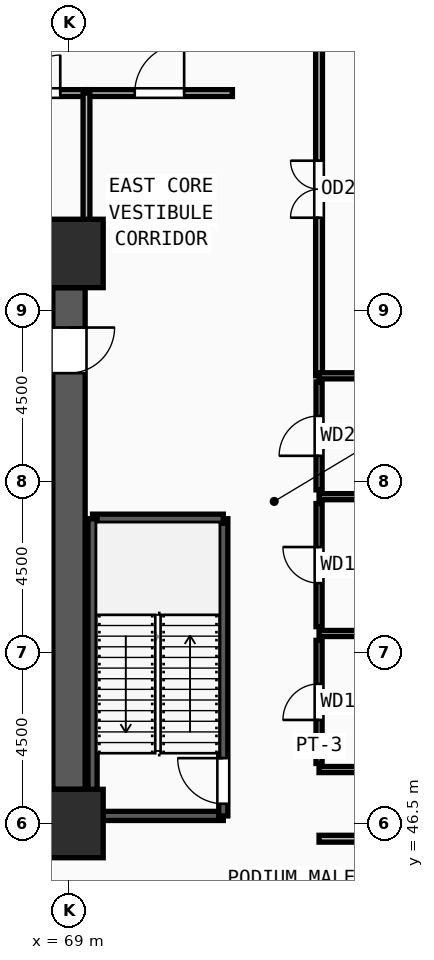
"""IFC4 building model, lengths in metres.
Left out: names, types, materials, properties, quantities, classifications, styles, units other than length and angle.
Written with IfcOpenShell. Run it as: python <this file> out.ifc"""

import sys

from ifc_helpers import new_model, si_unit, direction, frame, frame_2d, origin, origin_2d, place, context, subcontext, project, spatial, rectangle, extrude, source, transform, mapped, element, fill, save


model = new_model("IFC4")
c1 = context("Model", 3, precision=1e-05, world=origin(), true_north=direction((0.0, 1.0)))
c2 = subcontext(c1, "Body", "Model", "MODEL_VIEW")
j1 = project(units=[si_unit("LENGTHUNIT", "METRE"), si_unit("PLANEANGLEUNIT", "RADIAN")], contexts=[c1])
p1 = place(None, origin())
s1 = spatial("IfcSite", under=j1, at=p1, CompositionType="ELEMENT")
p2 = place(p1, origin())
s2 = spatial("IfcBuilding", under=s1, at=p2, CompositionType="ELEMENT")
p3 = place(p2, frame((0.0, 0.0, 14.4)))
s3 = spatial("IfcBuildingStorey", under=s2, at=p3, CompositionType="ELEMENT", Elevation=14.4)
m1 = source(origin(), c2, "Body", "SweptSolid", [
    extrude(rectangle(XDim=1.8, YDim=1.8, at=origin_2d()), origin(), (0.0, 0.0, 1.0), 4.5),
])
for number, where, z_axis, x_axis in (
    (1, (69.0, 46.5, 0.0), (0.0, 0.0, 1.0), (1.0, 0.0, 0.0)),
    (2, (69.0, 61.5, 0.0), (0.0, 0.0, 1.0), (1.0, 0.0, 0.0)),
):
    element("IfcColumn", number, at=place(p3, frame(where, z_axis=z_axis, x_axis=x_axis)), inside=s3, PredefinedType="COLUMN", context=c2, shape_type="MappedRepresentation", body=[
        mapped(m1, transform((0.0, 0.0, 0.0), x_axis=(1.0, 0.0, 0.0), y_axis=(0.0, 1.0, 0.0), z_axis=(0.0, 0.0, 1.0), scale=1.0)),
    ])
p4 = place(p3, frame((69.0, 60.6, 0.0), z_axis=(0.0, 0.0, 1.0), x_axis=(0.0, -1.0, 0.0)))
e3 = element("IfcWall", 3, at=p4, inside=s3, PredefinedType="SHEAR", context=c2, shape_type="SweptSolid", body=[
    extrude(rectangle(XDim=13.2, YDim=0.85, at=frame_2d((6.6, 0.0))), origin(), (0.0, 0.0, 1.0), 4.25),
])
m2 = source(origin(), c2, "Body", "SweptSolid", [
    extrude(rectangle(XDim=1.2, YDim=2.2, at=frame_2d((0.6, 1.1))), frame((0.0, 0.435, 0.0), z_axis=(0.0, -1.0, 0.0), x_axis=(1.0, 0.0, 0.0)), (0.0, 0.0, 1.0), 0.87),
])
p5 = place(p4, frame((1.05, 0.0, 0.0)))
e4 = element("IfcOpeningElement", 4, at=p5, cuts=e3, PredefinedType="OPENING", context=c2, shape_type="MappedRepresentation", body=[
    mapped(m2, transform((0.0, 0.0, 0.0), x_axis=(1.0, 0.0, 0.0), y_axis=(0.0, 1.0, 0.0), z_axis=(0.0, 0.0, 1.0), scale=1.0)),
])
p6 = place(p3, frame((69.62, 46.7, 0.0), z_axis=(0.0, 0.0, 1.0), x_axis=(1.0, 0.0, 0.0)))
e5 = element("IfcWall", 5, at=p6, inside=s3, PredefinedType="SOLIDWALL", context=c2, shape_type="SweptSolid", body=[
    extrude(rectangle(XDim=3.44, YDim=0.24, at=frame_2d((1.72, 0.0))), origin(), (0.0, 0.0, 1.0), 4.25),
])
p7 = place(p3, frame((73.06, 46.7, 0.0), z_axis=(0.0, 0.0, 1.0), x_axis=(0.0, 1.0, 0.0)))
e6 = element("IfcWall", 6, at=p7, inside=s3, PredefinedType="SOLIDWALL", context=c2, shape_type="SweptSolid", body=[
    extrude(rectangle(XDim=7.82, YDim=0.24, at=frame_2d((3.91, 0.0))), origin(), (0.0, 0.0, 1.0), 4.25),
])
m3 = source(origin(), c2, "Body", "SweptSolid", [
    extrude(rectangle(XDim=1.2, YDim=2.2, at=frame_2d((0.6, 1.1))), frame((0.0, 0.13, 0.0), z_axis=(0.0, -1.0, 0.0), x_axis=(1.0, 0.0, 0.0)), (0.0, 0.0, 1.0), 0.26),
])
p8 = place(p7, frame((0.32, 0.0, 0.0)))
e7 = element("IfcOpeningElement", 7, at=p8, cuts=e6, PredefinedType="OPENING", context=c2, shape_type="MappedRepresentation", body=[
    mapped(m3, transform((0.0, 0.0, 0.0), x_axis=(1.0, 0.0, 0.0), y_axis=(0.0, 1.0, 0.0), z_axis=(0.0, 0.0, 1.0), scale=1.0)),
])
p9 = place(p3, frame((73.06, 54.52, 0.0), z_axis=(0.0, 0.0, 1.0), x_axis=(-1.0, 0.0, 0.0)))
e8 = element("IfcWall", 8, at=p9, inside=s3, PredefinedType="SOLIDWALL", context=c2, shape_type="SweptSolid", body=[
    extrude(rectangle(XDim=3.44, YDim=0.24, at=frame_2d((1.72, 0.0))), origin(), (0.0, 0.0, 1.0), 4.25),
])
p10 = place(p3, frame((69.62, 54.52, 0.0), z_axis=(0.0, 0.0, 1.0), x_axis=(0.0, -1.0, 0.0)))
e9 = element("IfcWall", 9, at=p10, inside=s3, PredefinedType="SOLIDWALL", context=c2, shape_type="SweptSolid", body=[
    extrude(rectangle(XDim=7.82, YDim=0.24, at=frame_2d((3.91, 0.0))), origin(), (0.0, 0.0, 1.0), 4.25),
])
p11 = place(p3, frame((75.58, 48.08, 0.0), z_axis=(0.0, 0.0, 1.0), x_axis=(0.0, 1.0, 0.0)))
e10 = element("IfcWall", 10, at=p11, inside=s3, PredefinedType="PARTITIONING", context=c2, shape_type="SweptSolid", body=[
    extrude(rectangle(XDim=3.24, YDim=0.16, at=frame_2d((1.62, 0.0))), origin(), (0.0, 0.0, 1.0), 4.25),
])
m4 = source(origin(), c2, "Body", "SweptSolid", [
    extrude(rectangle(XDim=0.95, YDim=2.15, at=frame_2d((0.475, 1.075))), frame((0.0, 0.09, 0.0), z_axis=(0.0, -1.0, 0.0), x_axis=(1.0, 0.0, 0.0)), (0.0, 0.0, 1.0), 0.18),
])
p12 = place(p11, frame((1.145, 0.0, 0.0)))
e11 = element("IfcOpeningElement", 11, at=p12, cuts=e10, PredefinedType="OPENING", context=c2, shape_type="MappedRepresentation", body=[
    mapped(m4, transform((0.0, 0.0, 0.0), x_axis=(1.0, 0.0, 0.0), y_axis=(0.0, 1.0, 0.0), z_axis=(0.0, 0.0, 1.0), scale=1.0)),
])
p13 = place(p3, frame((75.58, 51.68, 0.0), z_axis=(0.0, 0.0, 1.0), x_axis=(0.0, 1.0, 0.0)))
e12 = element("IfcWall", 12, at=p13, inside=s3, PredefinedType="PARTITIONING", context=c2, shape_type="SweptSolid", body=[
    extrude(rectangle(XDim=3.24, YDim=0.16, at=frame_2d((1.62, 0.0))), origin(), (0.0, 0.0, 1.0), 4.25),
])
p14 = place(p13, frame((1.145, 0.0, 0.0)))
e13 = element("IfcOpeningElement", 13, at=p14, cuts=e12, PredefinedType="OPENING", context=c2, shape_type="MappedRepresentation", body=[
    mapped(m4, transform((0.0, 0.0, 0.0), x_axis=(1.0, 0.0, 0.0), y_axis=(0.0, 1.0, 0.0), z_axis=(0.0, 0.0, 1.0), scale=1.0)),
])
p15 = place(p3, frame((75.58, 55.28, 0.0), z_axis=(0.0, 0.0, 1.0), x_axis=(0.0, 1.0, 0.0)))
e14 = element("IfcWall", 14, at=p15, inside=s3, PredefinedType="PARTITIONING", context=c2, shape_type="SweptSolid", body=[
    extrude(rectangle(XDim=2.84, YDim=0.16, at=frame_2d((1.42, 0.0))), origin(), (0.0, 0.0, 1.0), 4.25),
])
m5 = source(origin(), c2, "Body", "SweptSolid", [
    extrude(rectangle(XDim=1.05, YDim=2.15, at=frame_2d((0.525, 1.075))), frame((0.0, 0.09, 0.0), z_axis=(0.0, -1.0, 0.0), x_axis=(1.0, 0.0, 0.0)), (0.0, 0.0, 1.0), 0.18),
])
p16 = place(p15, frame((0.895, 0.0, 0.0)))
e15 = element("IfcOpeningElement", 15, at=p16, cuts=e14, PredefinedType="OPENING", context=c2, shape_type="MappedRepresentation", body=[
    mapped(m5, transform((0.0, 0.0, 0.0), x_axis=(1.0, 0.0, 0.0), y_axis=(0.0, 1.0, 0.0), z_axis=(0.0, 0.0, 1.0), scale=1.0)),
])
p17 = place(p3, frame((67.08, 65.72, 0.0), z_axis=(0.0, 0.0, 1.0), x_axis=(1.0, 0.0, 0.0)))
e16 = element("IfcWall", 16, at=p17, inside=s3, PredefinedType="PARTITIONING", context=c2, shape_type="SweptSolid", body=[
    extrude(rectangle(XDim=2.38, YDim=0.18, at=frame_2d((1.19, 0.0))), origin(), (0.0, 0.0, 1.0), 4.25),
])
m6 = source(origin(), c2, "Body", "SweptSolid", [
    extrude(rectangle(XDim=1.0, YDim=2.2, at=frame_2d((0.5, 1.1))), frame((0.0, 0.1, 0.0), z_axis=(0.0, -1.0, 0.0), x_axis=(1.0, 0.0, 0.0)), (0.0, 0.0, 1.0), 0.2),
])
p18 = place(p17, frame((0.69, 0.0, 0.0)))
e17 = element("IfcOpeningElement", 17, at=p18, cuts=e16, PredefinedType="OPENING", context=c2, shape_type="MappedRepresentation", body=[
    mapped(m6, transform((0.0, 0.0, 0.0), x_axis=(1.0, 0.0, 0.0), y_axis=(0.0, 1.0, 0.0), z_axis=(0.0, 0.0, 1.0), scale=1.0)),
])
p19 = place(p3, frame((69.46, 65.72, 0.0), z_axis=(0.0, 0.0, 1.0), x_axis=(1.0, 0.0, 0.0)))
e18 = element("IfcWall", 18, at=p19, inside=s3, PredefinedType="PARTITIONING", context=c2, shape_type="SweptSolid", body=[
    extrude(rectangle(XDim=3.84, YDim=0.18, at=frame_2d((1.92, 0.0))), origin(), (0.0, 0.0, 1.0), 4.25),
])
m7 = source(origin(), c2, "Body", "SweptSolid", [
    extrude(rectangle(XDim=1.3, YDim=2.2, at=frame_2d((0.65, 1.1))), frame((0.0, 0.1, 0.0), z_axis=(0.0, -1.0, 0.0), x_axis=(1.0, 0.0, 0.0)), (0.0, 0.0, 1.0), 0.2),
])
p20 = place(p19, frame((1.27, 0.0, 0.0)))
e19 = element("IfcOpeningElement", 19, at=p20, cuts=e18, PredefinedType="OPENING", context=c2, shape_type="MappedRepresentation", body=[
    mapped(m7, transform((0.0, 0.0, 0.0), x_axis=(1.0, 0.0, 0.0), y_axis=(0.0, 1.0, 0.0), z_axis=(0.0, 0.0, 1.0), scale=1.0)),
])
p21 = place(p3, frame((75.58, 58.28, 0.0), z_axis=(0.0, 0.0, 1.0), x_axis=(0.0, 1.0, 0.0)))
e20 = element("IfcWall", 20, at=p21, inside=s3, PredefinedType="PARTITIONING", context=c2, shape_type="SweptSolid", body=[
    extrude(rectangle(XDim=9.82, YDim=0.18, at=frame_2d((4.91, 0.0))), origin(), (0.0, 0.0, 1.0), 4.25),
])
m8 = source(origin(), c2, "Body", "SweptSolid", [
    extrude(rectangle(XDim=1.5, YDim=2.2, at=frame_2d((0.75, 1.1))), frame((0.0, 0.1, 0.0), z_axis=(0.0, -1.0, 0.0), x_axis=(1.0, 0.0, 0.0)), (0.0, 0.0, 1.0), 0.2),
])
p22 = place(p21, frame((4.16, 0.0, 0.0)))
e21 = element("IfcOpeningElement", 21, at=p22, cuts=e20, PredefinedType="OPENING", context=c2, shape_type="MappedRepresentation", body=[
    mapped(m8, transform((0.0, 0.0, 0.0), x_axis=(1.0, 0.0, 0.0), y_axis=(0.0, 1.0, 0.0), z_axis=(0.0, 0.0, 1.0), scale=1.0)),
])
for number, where, z_axis, x_axis in (
    (22, (75.58, 47.92, 0.0), (0.0, 0.0, 1.0), (1.0, 0.0, 0.0)),
    (23, (75.58, 51.5, 0.0), (0.0, 0.0, 1.0), (1.0, 0.0, 0.0)),
    (24, (75.58, 55.1, 0.0), (0.0, 0.0, 1.0), (1.0, 0.0, 0.0)),
    (25, (75.58, 58.28, 0.0), (0.0, 0.0, 1.0), (1.0, 0.0, 0.0)),
):
    element("IfcWall", number, at=place(p3, frame(where, z_axis=z_axis, x_axis=x_axis)), inside=s3, PredefinedType="PARTITIONING", context=c2, shape_type="SweptSolid", body=[
        extrude(rectangle(XDim=4.34, YDim=0.16, at=frame_2d((2.17, 0.0))), origin(), (0.0, 0.0, 1.0), 4.25),
    ])
p23 = place(p3, frame((75.58, 46.1, 0.0), z_axis=(0.0, 0.0, 1.0), x_axis=(1.0, 0.0, 0.0)))
e26 = element("IfcWall", 26, at=p23, inside=s3, PredefinedType="PARTITIONING", context=c2, shape_type="SweptSolid", body=[
    extrude(rectangle(XDim=24.995, YDim=0.18, at=frame_2d((12.498, 0.0))), origin(), (0.0, 0.0, 1.0), 4.25),
])
p24 = place(p3, frame((69.46, 61.95, 0.0), z_axis=(0.0, 0.0, 1.0), x_axis=(0.0, 1.0, 0.0)))
e27 = element("IfcWall", 27, at=p24, inside=s3, PredefinedType="PARTITIONING", context=c2, shape_type="SweptSolid", body=[
    extrude(rectangle(XDim=3.77, YDim=0.18, at=frame_2d((1.885, 0.0))), origin(), (0.0, 0.0, 1.0), 4.25),
])
m9 = source(origin(), c2, "Body", "SweptSolid", [
    extrude(rectangle(XDim=1.2, YDim=2.2, at=frame_2d((0.6, 1.1))), frame((0.0, 0.025, 0.0), z_axis=(0.0, -1.0, 0.0), x_axis=(1.0, 0.0, 0.0)), (0.0, 0.0, 1.0), 0.05),
])
p25 = place(p5, origin())
e28 = element("IfcDoor", 28, at=p25, inside=s3, OperationType="SINGLE_SWING_LEFT", PredefinedType="DOOR", context=c2, shape_type="MappedRepresentation", body=[
    mapped(m9, transform((0.0, 0.0, 0.0), x_axis=(1.0, 0.0, 0.0), y_axis=(0.0, 1.0, 0.0), z_axis=(0.0, 0.0, 1.0), scale=1.0)),
])
fill(e4, e28)
p26 = place(p8, origin())
e29 = element("IfcDoor", 29, at=p26, inside=s3, OperationType="SINGLE_SWING_RIGHT", PredefinedType="DOOR", context=c2, shape_type="MappedRepresentation", body=[
    mapped(m9, transform((0.0, 0.0, 0.0), x_axis=(1.0, 0.0, 0.0), y_axis=(0.0, 1.0, 0.0), z_axis=(0.0, 0.0, 1.0), scale=1.0)),
])
fill(e7, e29)
m10 = source(origin(), c2, "Body", "SweptSolid", [
    extrude(rectangle(XDim=0.95, YDim=2.15, at=frame_2d((0.475, 1.075))), frame((0.0, 0.025, 0.0), z_axis=(0.0, -1.0, 0.0), x_axis=(1.0, 0.0, 0.0)), (0.0, 0.0, 1.0), 0.05),
])
p27 = place(p12, origin())
e30 = element("IfcDoor", 30, at=p27, inside=s3, OperationType="SINGLE_SWING_LEFT", PredefinedType="DOOR", context=c2, shape_type="MappedRepresentation", body=[
    mapped(m10, transform((0.0, 0.0, 0.0), x_axis=(1.0, 0.0, 0.0), y_axis=(0.0, 1.0, 0.0), z_axis=(0.0, 0.0, 1.0), scale=1.0)),
])
fill(e11, e30)
p28 = place(p14, origin())
e31 = element("IfcDoor", 31, at=p28, inside=s3, OperationType="SINGLE_SWING_RIGHT", PredefinedType="DOOR", context=c2, shape_type="MappedRepresentation", body=[
    mapped(m10, transform((0.0, 0.0, 0.0), x_axis=(1.0, 0.0, 0.0), y_axis=(0.0, 1.0, 0.0), z_axis=(0.0, 0.0, 1.0), scale=1.0)),
])
fill(e13, e31)
m11 = source(origin(), c2, "Body", "SweptSolid", [
    extrude(rectangle(XDim=1.05, YDim=2.15, at=frame_2d((0.525, 1.075))), frame((0.0, 0.025, 0.0), z_axis=(0.0, -1.0, 0.0), x_axis=(1.0, 0.0, 0.0)), (0.0, 0.0, 1.0), 0.05),
])
p29 = place(p16, origin())
e32 = element("IfcDoor", 32, at=p29, inside=s3, OperationType="SINGLE_SWING_LEFT", PredefinedType="DOOR", context=c2, shape_type="MappedRepresentation", body=[
    mapped(m11, transform((0.0, 0.0, 0.0), x_axis=(1.0, 0.0, 0.0), y_axis=(0.0, 1.0, 0.0), z_axis=(0.0, 0.0, 1.0), scale=1.0)),
])
fill(e15, e32)
m12 = source(origin(), c2, "Body", "SweptSolid", [
    extrude(rectangle(XDim=1.0, YDim=2.2, at=frame_2d((0.5, 1.1))), frame((0.0, 0.025, 0.0), z_axis=(0.0, -1.0, 0.0), x_axis=(1.0, 0.0, 0.0)), (0.0, 0.0, 1.0), 0.05),
])
p30 = place(p18, origin())
e33 = element("IfcDoor", 33, at=p30, inside=s3, OperationType="SINGLE_SWING_RIGHT", PredefinedType="DOOR", context=c2, shape_type="MappedRepresentation", body=[
    mapped(m12, transform((0.0, 0.0, 0.0), x_axis=(1.0, 0.0, 0.0), y_axis=(0.0, 1.0, 0.0), z_axis=(0.0, 0.0, 1.0), scale=1.0)),
])
fill(e17, e33)
m13 = source(origin(), c2, "Body", "SweptSolid", [
    extrude(rectangle(XDim=1.3, YDim=2.2, at=frame_2d((0.65, 1.1))), frame((0.0, 0.025, 0.0), z_axis=(0.0, -1.0, 0.0), x_axis=(1.0, 0.0, 0.0)), (0.0, 0.0, 1.0), 0.05),
])
p31 = place(p20, origin())
e34 = element("IfcDoor", 34, at=p31, inside=s3, OperationType="SINGLE_SWING_RIGHT", PredefinedType="DOOR", context=c2, shape_type="MappedRepresentation", body=[
    mapped(m13, transform((0.0, 0.0, 0.0), x_axis=(1.0, 0.0, 0.0), y_axis=(0.0, 1.0, 0.0), z_axis=(0.0, 0.0, 1.0), scale=1.0)),
])
fill(e19, e34)
m14 = source(origin(), c2, "Body", "SweptSolid", [
    extrude(rectangle(XDim=1.5, YDim=2.2, at=frame_2d((0.75, 1.1))), frame((0.0, 0.025, 0.0), z_axis=(0.0, -1.0, 0.0), x_axis=(1.0, 0.0, 0.0)), (0.0, 0.0, 1.0), 0.05),
])
p32 = place(p22, origin())
e35 = element("IfcDoor", 35, at=p32, inside=s3, OperationType="DOUBLE_DOOR_SINGLE_SWING", PredefinedType="DOOR", context=c2, shape_type="MappedRepresentation", body=[
    mapped(m14, transform((0.0, 0.0, 0.0), x_axis=(1.0, 0.0, 0.0), y_axis=(0.0, 1.0, 0.0), z_axis=(0.0, 0.0, 1.0), scale=1.0)),
])
fill(e21, e35)
save(model, sys.argv[1])
